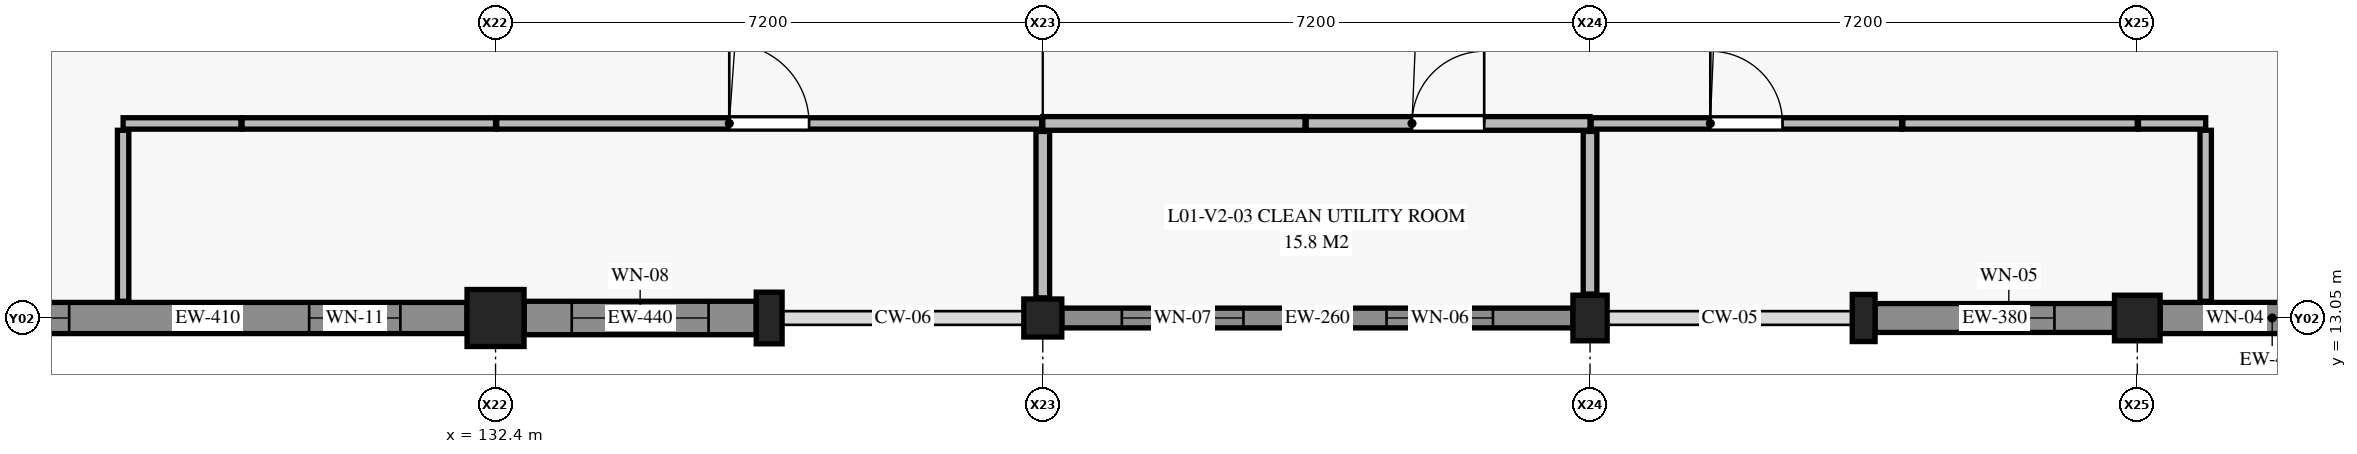
"""IFC4 building model, lengths in metres.
Left out: names, types, materials, properties, quantities, classifications, styles, units other than length and angle.
Written with IfcOpenShell. Run it as: python <this file> out.ifc"""

import sys

from ifc_helpers import new_model, si_unit, direction, frame, frame_2d, origin, origin_2d, place, context, subcontext, project, spatial, rectangle, extrude, element, fill, save


model = new_model("IFC4")
c1 = context("Model", 3, precision=1e-05, world=origin(), true_north=direction((0.0, 1.0)))
c2 = subcontext(c1, "Body", "Model", "MODEL_VIEW")
j1 = project(units=[si_unit("LENGTHUNIT", "METRE"), si_unit("PLANEANGLEUNIT", "RADIAN")], contexts=[c1])
p1 = place(None, origin())
s1 = spatial("IfcSite", under=j1, at=p1, CompositionType="ELEMENT")
p2 = place(p1, origin())
s2 = spatial("IfcBuilding", under=s1, at=p2, CompositionType="ELEMENT")
p3 = place(p2, frame((0.0, 0.0, 4.8)))
s3 = spatial("IfcBuildingStorey", under=s2, at=p3, CompositionType="ELEMENT", Elevation=4.8)
p4 = place(p3, frame((132.4, 13.05, 0.0), z_axis=(0.0, 0.0, 1.0), x_axis=(1.0, 0.0, 0.0)))
e1 = element("IfcColumn", 1, at=p4, inside=s3, PredefinedType="COLUMN", context=c2, shape_type="SweptSolid", body=[
    extrude(rectangle(XDim=0.75, YDim=0.75, at=origin_2d()), origin(), (0.0, 0.0, 1.0), 4.36),
])
p5 = place(p3, frame((139.6, 13.05, 0.0), z_axis=(0.0, 0.0, 1.0), x_axis=(1.0, 0.0, 0.0)))
e2 = element("IfcColumn", 2, at=p5, inside=s3, PredefinedType="COLUMN", context=c2, shape_type="SweptSolid", body=[
    extrude(rectangle(XDim=0.5, YDim=0.5, at=origin_2d()), origin(), (0.0, 0.0, 1.0), 4.36),
])
p6 = place(p3, frame((146.8, 13.05, 0.0), z_axis=(0.0, 0.0, 1.0), x_axis=(1.0, 0.0, 0.0)))
e3 = element("IfcColumn", 3, at=p6, inside=s3, PredefinedType="COLUMN", context=c2, shape_type="SweptSolid", body=[
    extrude(rectangle(XDim=0.45, YDim=0.6, at=origin_2d()), origin(), (0.0, 0.0, 1.0), 4.36),
])
p7 = place(p3, frame((154.0, 13.05, 0.0), z_axis=(0.0, 0.0, 1.0), x_axis=(1.0, 0.0, 0.0)))
e4 = element("IfcColumn", 4, at=p7, inside=s3, PredefinedType="COLUMN", context=c2, shape_type="SweptSolid", body=[
    extrude(rectangle(XDim=0.6, YDim=0.6, at=origin_2d()), origin(), (0.0, 0.0, 1.0), 4.36),
])
p8 = place(p3, frame((136.0, 13.05, 0.0), z_axis=(0.0, 0.0, 1.0), x_axis=(1.0, 0.0, 0.0)))
e5 = element("IfcColumn", 5, at=p8, inside=s3, PredefinedType="PILASTER", context=c2, shape_type="SweptSolid", body=[
    extrude(rectangle(XDim=0.34, YDim=0.68, at=origin_2d()), origin(), (0.0, 0.0, 1.0), 4.2),
])
p9 = place(p3, frame((150.4, 13.05, 0.0), z_axis=(0.0, 0.0, 1.0), x_axis=(1.0, 0.0, 0.0)))
e6 = element("IfcColumn", 6, at=p9, inside=s3, PredefinedType="PILASTER", context=c2, shape_type="SweptSolid", body=[
    extrude(rectangle(XDim=0.3, YDim=0.62, at=origin_2d()), origin(), (0.0, 0.0, 1.0), 4.2),
])
p10 = place(p3, frame((157.25, 13.05, 0.0), z_axis=(0.0, 0.0, 1.0), x_axis=(-1.0, 0.0, 0.0)))
e7 = element("IfcWall", 7, at=p10, inside=s3, PredefinedType="USERDEFINED", context=c2, shape_type="SweptSolid", body=[
    extrude(rectangle(XDim=2.95, YDim=0.41, at=frame_2d((1.475, 0.0))), origin(), (0.0, 0.0, 1.0), 3.38),
])
p11 = place(p10, frame((0.64, 0.0, 0.9)))
e8 = element("IfcOpeningElement", 8, at=p11, cuts=e7, PredefinedType="OPENING", context=c2, shape_type="SweptSolid", body=[
    extrude(rectangle(XDim=1.05, YDim=1.8, at=frame_2d((0.525, 0.9))), frame((0.0, 0.215, 0.0), z_axis=(0.0, -1.0, 0.0), x_axis=(1.0, 0.0, 0.0)), (0.0, 0.0, 1.0), 0.43),
])
p12 = place(p3, frame((153.7, 13.05, 0.0), z_axis=(0.0, 0.0, 1.0), x_axis=(-1.0, 0.0, 0.0)))
e9 = element("IfcWall", 9, at=p12, inside=s3, PredefinedType="USERDEFINED", context=c2, shape_type="SweptSolid", body=[
    extrude(rectangle(XDim=3.15, YDim=0.38, at=frame_2d((1.575, 0.0))), origin(), (0.0, 0.0, 1.0), 3.38),
])
p13 = place(p12, frame((0.79, 0.0, 0.9)))
e10 = element("IfcOpeningElement", 10, at=p13, cuts=e9, PredefinedType="OPENING", context=c2, shape_type="SweptSolid", body=[
    extrude(rectangle(XDim=1.2, YDim=1.8, at=frame_2d((0.6, 0.9))), frame((0.0, 0.2, 0.0), z_axis=(0.0, -1.0, 0.0), x_axis=(1.0, 0.0, 0.0)), (0.0, 0.0, 1.0), 0.4),
])
p14 = place(p3, frame((146.575, 13.05, 0.0), z_axis=(0.0, 0.0, 1.0), x_axis=(-1.0, 0.0, 0.0)))
e11 = element("IfcWall", 11, at=p14, inside=s3, PredefinedType="SOLIDWALL", context=c2, shape_type="SweptSolid", body=[
    extrude(rectangle(XDim=6.725, YDim=0.26, at=frame_2d((3.362, 0.0))), origin(), (0.0, 0.0, 1.0), 3.3),
])
p15 = place(p14, frame((1.052, 0.0, 0.9)))
e12 = element("IfcOpeningElement", 12, at=p15, cuts=e11, PredefinedType="OPENING", context=c2, shape_type="SweptSolid", body=[
    extrude(rectangle(XDim=1.4, YDim=1.8, at=frame_2d((0.7, 0.9))), frame((0.0, 0.14, 0.0), z_axis=(0.0, -1.0, 0.0), x_axis=(1.0, 0.0, 0.0)), (0.0, 0.0, 1.0), 0.28),
])
p16 = place(p14, frame((4.335, 0.0, 0.9)))
e13 = element("IfcOpeningElement", 13, at=p16, cuts=e11, PredefinedType="OPENING", context=c2, shape_type="SweptSolid", body=[
    extrude(rectangle(XDim=1.6, YDim=1.8, at=frame_2d((0.8, 0.9))), frame((0.0, 0.14, 0.0), z_axis=(0.0, -1.0, 0.0), x_axis=(1.0, 0.0, 0.0)), (0.0, 0.0, 1.0), 0.28),
])
p17 = place(p3, frame((135.83, 13.05, 0.0), z_axis=(0.0, 0.0, 1.0), x_axis=(-1.0, 0.0, 0.0)))
e14 = element("IfcWall", 14, at=p17, inside=s3, PredefinedType="USERDEFINED", context=c2, shape_type="SweptSolid", body=[
    extrude(rectangle(XDim=3.055, YDim=0.44, at=frame_2d((1.528, 0.0))), origin(), (0.0, 0.0, 1.0), 3.38),
])
p18 = place(p17, frame((0.627, 0.0, 0.9)))
e15 = element("IfcOpeningElement", 15, at=p18, cuts=e14, PredefinedType="OPENING", context=c2, shape_type="SweptSolid", body=[
    extrude(rectangle(XDim=1.8, YDim=1.8, at=frame_2d((0.9, 0.9))), frame((0.0, 0.23, 0.0), z_axis=(0.0, -1.0, 0.0), x_axis=(1.0, 0.0, 0.0)), (0.0, 0.0, 1.0), 0.46),
])
p19 = place(p3, frame((132.025, 13.05, 0.0), z_axis=(0.0, 0.0, 1.0), x_axis=(-1.0, 0.0, 0.0)))
e16 = element("IfcWall", 16, at=p19, inside=s3, PredefinedType="USERDEFINED", context=c2, shape_type="SweptSolid", body=[
    extrude(rectangle(XDim=6.825, YDim=0.41, at=frame_2d((3.413, 0.0))), origin(), (0.0, 0.0, 1.0), 3.38),
])
p20 = place(p19, frame((0.877, 0.0, 0.9)))
e17 = element("IfcOpeningElement", 17, at=p20, cuts=e16, PredefinedType="OPENING", context=c2, shape_type="SweptSolid", body=[
    extrude(rectangle(XDim=1.2, YDim=1.5, at=frame_2d((0.6, 0.75))), frame((0.0, 0.215, 0.0), z_axis=(0.0, -1.0, 0.0), x_axis=(1.0, 0.0, 0.0)), (0.0, 0.0, 1.0), 0.43),
])
p21 = place(p19, frame((5.235, 0.0, 0.95)))
e18 = element("IfcOpeningElement", 18, at=p21, cuts=e16, PredefinedType="OPENING", context=c2, shape_type="SweptSolid", body=[
    extrude(rectangle(XDim=0.9, YDim=1.2, at=frame_2d((0.45, 0.6))), frame((0.0, 0.215, 0.0), z_axis=(0.0, -1.0, 0.0), x_axis=(1.0, 0.0, 0.0)), (0.0, 0.0, 1.0), 0.43),
])
p22 = place(p3, frame((139.6, 15.61, 0.0), z_axis=(0.0, 0.0, 1.0), x_axis=(1.0, 0.0, 0.0)))
e19 = element("IfcWall", 19, at=p22, inside=s3, PredefinedType="PLUMBINGWALL", context=c2, shape_type="SweptSolid", body=[
    extrude(rectangle(XDim=3.45, YDim=0.18, at=frame_2d((1.725, 0.0))), origin(), (0.0, 0.0, 1.0), 3.95),
])
p23 = place(p3, frame((143.065, 15.61, 0.0), z_axis=(0.0, 0.0, 1.0), x_axis=(1.0, 0.0, 0.0)))
e20 = element("IfcWall", 20, at=p23, inside=s3, PredefinedType="PLUMBINGWALL", context=c2, shape_type="SweptSolid", body=[
    extrude(rectangle(XDim=3.735, YDim=0.18, at=frame_2d((1.868, 0.0))), origin(), (0.0, 0.0, 1.0), 3.95),
])
p24 = place(p23, frame((1.393, 0.0, 0.0)))
e21 = element("IfcOpeningElement", 21, at=p24, cuts=e20, PredefinedType="OPENING", context=c2, shape_type="SweptSolid", body=[
    extrude(rectangle(XDim=0.95, YDim=2.1, at=frame_2d((0.475, 1.05))), frame((0.0, 0.1, 0.0), z_axis=(0.0, -1.0, 0.0), x_axis=(1.0, 0.0, 0.0)), (0.0, 0.0, 1.0), 0.2),
])
p25 = place(p3, frame((127.5, 15.61, 0.0), z_axis=(0.0, 0.0, 1.0), x_axis=(1.0, 0.0, 0.0)))
e22 = element("IfcWall", 22, at=p25, inside=s3, PredefinedType="PARTITIONING", context=c2, shape_type="SweptSolid", body=[
    extrude(rectangle(XDim=1.55, YDim=0.15, at=frame_2d((0.775, 0.0))), origin(), (0.0, 0.0, 1.0), 3.95),
])
p26 = place(p3, frame((129.065, 15.61, 0.0), z_axis=(0.0, 0.0, 1.0), x_axis=(1.0, 0.0, 0.0)))
e23 = element("IfcWall", 23, at=p26, inside=s3, PredefinedType="PARTITIONING", context=c2, shape_type="SweptSolid", body=[
    extrude(rectangle(XDim=3.335, YDim=0.15, at=frame_2d((1.667, 0.0))), origin(), (0.0, 0.0, 1.0), 3.95),
])
p27 = place(p3, frame((132.415, 15.61, 0.0), z_axis=(0.0, 0.0, 1.0), x_axis=(1.0, 0.0, 0.0)))
e24 = element("IfcWall", 24, at=p27, inside=s3, PredefinedType="PARTITIONING", context=c2, shape_type="SweptSolid", body=[
    extrude(rectangle(XDim=7.17, YDim=0.15, at=frame_2d((3.585, 0.0))), origin(), (0.0, 0.0, 1.0), 3.95),
])
p28 = place(p27, frame((3.06, 0.0, 0.0)))
e25 = element("IfcOpeningElement", 25, at=p28, cuts=e24, PredefinedType="OPENING", context=c2, shape_type="SweptSolid", body=[
    extrude(rectangle(XDim=1.05, YDim=2.15, at=frame_2d((0.525, 1.075))), frame((0.0, 0.085, 0.0), z_axis=(0.0, -1.0, 0.0), x_axis=(1.0, 0.0, 0.0)), (0.0, 0.0, 1.0), 0.17),
])
p29 = place(p3, frame((127.5, 13.27, 0.0), z_axis=(0.0, 0.0, 1.0), x_axis=(0.0, 1.0, 0.0)))
e26 = element("IfcWall", 26, at=p29, inside=s3, PredefinedType="PARTITIONING", context=c2, shape_type="SweptSolid", body=[
    extrude(rectangle(XDim=2.25, YDim=0.15, at=frame_2d((1.125, 0.0))), origin(), (0.0, 0.0, 1.0), 3.95),
])
p30 = place(p3, frame((146.815, 15.61, 0.0), z_axis=(0.0, 0.0, 1.0), x_axis=(1.0, 0.0, 0.0)))
e27 = element("IfcWall", 27, at=p30, inside=s3, PredefinedType="PARTITIONING", context=c2, shape_type="SweptSolid", body=[
    extrude(rectangle(XDim=4.085, YDim=0.15, at=frame_2d((2.042, 0.0))), origin(), (0.0, 0.0, 1.0), 3.95),
])
p31 = place(p30, frame((1.567, 0.0, 0.0)))
e28 = element("IfcOpeningElement", 28, at=p31, cuts=e27, PredefinedType="OPENING", context=c2, shape_type="SweptSolid", body=[
    extrude(rectangle(XDim=0.95, YDim=2.1, at=frame_2d((0.475, 1.05))), frame((0.0, 0.085, 0.0), z_axis=(0.0, -1.0, 0.0), x_axis=(1.0, 0.0, 0.0)), (0.0, 0.0, 1.0), 0.17),
])
p32 = place(p3, frame((150.915, 15.61, 0.0), z_axis=(0.0, 0.0, 1.0), x_axis=(1.0, 0.0, 0.0)))
e29 = element("IfcWall", 29, at=p32, inside=s3, PredefinedType="PARTITIONING", context=c2, shape_type="SweptSolid", body=[
    extrude(rectangle(XDim=3.085, YDim=0.15, at=frame_2d((1.542, 0.0))), origin(), (0.0, 0.0, 1.0), 3.95),
])
p33 = place(p3, frame((154.015, 15.61, 0.0), z_axis=(0.0, 0.0, 1.0), x_axis=(1.0, 0.0, 0.0)))
e30 = element("IfcWall", 30, at=p33, inside=s3, PredefinedType="PARTITIONING", context=c2, shape_type="SweptSolid", body=[
    extrude(rectangle(XDim=0.885, YDim=0.15, at=frame_2d((0.442, 0.0))), origin(), (0.0, 0.0, 1.0), 3.95),
])
p34 = place(p3, frame((154.9, 13.27, 0.0), z_axis=(0.0, 0.0, 1.0), x_axis=(0.0, 1.0, 0.0)))
e31 = element("IfcWall", 31, at=p34, inside=s3, PredefinedType="PARTITIONING", context=c2, shape_type="SweptSolid", body=[
    extrude(rectangle(XDim=2.25, YDim=0.15, at=frame_2d((1.125, 0.0))), origin(), (0.0, 0.0, 1.0), 3.95),
])
p35 = place(p3, frame((139.6, 13.315, 0.0), z_axis=(0.0, 0.0, 1.0), x_axis=(0.0, 1.0, 0.0)))
e32 = element("IfcWall", 32, at=p35, inside=s3, PredefinedType="PLUMBINGWALL", context=c2, shape_type="SweptSolid", body=[
    extrude(rectangle(XDim=2.19, YDim=0.18, at=frame_2d((1.095, 0.0))), origin(), (0.0, 0.0, 1.0), 3.95),
])
p36 = place(p3, frame((146.8, 13.365, 0.0), z_axis=(0.0, 0.0, 1.0), x_axis=(0.0, 1.0, 0.0)))
e33 = element("IfcWall", 33, at=p36, inside=s3, PredefinedType="PLUMBINGWALL", context=c2, shape_type="SweptSolid", body=[
    extrude(rectangle(XDim=2.14, YDim=0.18, at=frame_2d((1.07, 0.0))), origin(), (0.0, 0.0, 1.0), 3.95),
])
p37 = place(p11, origin())
e34 = element("IfcWindow", 34, at=p37, inside=s3, PartitioningType="SINGLE_PANEL", PredefinedType="WINDOW", context=c2, shape_type="SweptSolid", body=[
    extrude(rectangle(XDim=1.05, YDim=1.8, at=frame_2d((0.525, 0.9))), frame((0.0, 0.03, 0.0), z_axis=(0.0, -1.0, 0.0), x_axis=(1.0, 0.0, 0.0)), (0.0, 0.0, 1.0), 0.06),
])
fill(e8, e34)
p38 = place(p13, origin())
e35 = element("IfcWindow", 35, at=p38, inside=s3, PartitioningType="SINGLE_PANEL", PredefinedType="WINDOW", context=c2, shape_type="SweptSolid", body=[
    extrude(rectangle(XDim=1.2, YDim=1.8, at=frame_2d((0.6, 0.9))), frame((0.0, 0.03, 0.0), z_axis=(0.0, -1.0, 0.0), x_axis=(1.0, 0.0, 0.0)), (0.0, 0.0, 1.0), 0.06),
])
fill(e10, e35)
p39 = place(p15, origin())
e36 = element("IfcWindow", 36, at=p39, inside=s3, PartitioningType="SINGLE_PANEL", PredefinedType="WINDOW", context=c2, shape_type="SweptSolid", body=[
    extrude(rectangle(XDim=1.4, YDim=1.8, at=frame_2d((0.7, 0.9))), frame((0.0, 0.03, 0.0), z_axis=(0.0, -1.0, 0.0), x_axis=(1.0, 0.0, 0.0)), (0.0, 0.0, 1.0), 0.06),
])
fill(e12, e36)
p40 = place(p16, origin())
e37 = element("IfcWindow", 37, at=p40, inside=s3, PartitioningType="SINGLE_PANEL", PredefinedType="WINDOW", context=c2, shape_type="SweptSolid", body=[
    extrude(rectangle(XDim=1.6, YDim=1.8, at=frame_2d((0.8, 0.9))), frame((0.0, 0.03, 0.0), z_axis=(0.0, -1.0, 0.0), x_axis=(1.0, 0.0, 0.0)), (0.0, 0.0, 1.0), 0.06),
])
fill(e13, e37)
p41 = place(p18, origin())
e38 = element("IfcWindow", 38, at=p41, inside=s3, PartitioningType="SINGLE_PANEL", PredefinedType="WINDOW", context=c2, shape_type="SweptSolid", body=[
    extrude(rectangle(XDim=1.8, YDim=1.8, at=frame_2d((0.9, 0.9))), frame((0.0, 0.03, 0.0), z_axis=(0.0, -1.0, 0.0), x_axis=(1.0, 0.0, 0.0)), (0.0, 0.0, 1.0), 0.06),
])
fill(e15, e38)
p42 = place(p20, origin())
e39 = element("IfcWindow", 39, at=p42, inside=s3, PartitioningType="SINGLE_PANEL", PredefinedType="WINDOW", context=c2, shape_type="SweptSolid", body=[
    extrude(rectangle(XDim=1.2, YDim=1.5, at=frame_2d((0.6, 0.75))), frame((0.0, 0.03, 0.0), z_axis=(0.0, -1.0, 0.0), x_axis=(1.0, 0.0, 0.0)), (0.0, 0.0, 1.0), 0.06),
])
fill(e17, e39)
p43 = place(p21, origin())
e40 = element("IfcWindow", 40, at=p43, inside=s3, PartitioningType="SINGLE_PANEL", PredefinedType="WINDOW", context=c2, shape_type="SweptSolid", body=[
    extrude(rectangle(XDim=0.9, YDim=1.2, at=frame_2d((0.45, 0.6))), frame((0.0, 0.03, 0.0), z_axis=(0.0, -1.0, 0.0), x_axis=(1.0, 0.0, 0.0)), (0.0, 0.0, 1.0), 0.06),
])
fill(e18, e40)
p44 = place(p28, origin())
e41 = element("IfcDoor", 41, at=p44, inside=s3, OperationType="SINGLE_SWING_LEFT", PredefinedType="DOOR", context=c2, shape_type="SweptSolid", body=[
    extrude(rectangle(XDim=1.05, YDim=2.15, at=frame_2d((0.525, 1.075))), frame((0.0, 0.025, 0.0), z_axis=(0.0, -1.0, 0.0), x_axis=(1.0, 0.0, 0.0)), (0.0, 0.0, 1.0), 0.05),
])
fill(e25, e41)
p45 = place(p24, origin())
e42 = element("IfcDoor", 42, at=p45, inside=s3, OperationType="SINGLE_SWING_RIGHT", PredefinedType="DOOR", context=c2, shape_type="SweptSolid", body=[
    extrude(rectangle(XDim=0.95, YDim=2.1, at=frame_2d((0.475, 1.05))), frame((0.0, 0.025, 0.0), z_axis=(0.0, -1.0, 0.0), x_axis=(1.0, 0.0, 0.0)), (0.0, 0.0, 1.0), 0.05),
])
fill(e21, e42)
p46 = place(p31, origin())
e43 = element("IfcDoor", 43, at=p46, inside=s3, OperationType="SINGLE_SWING_LEFT", PredefinedType="DOOR", context=c2, shape_type="SweptSolid", body=[
    extrude(rectangle(XDim=0.95, YDim=2.1, at=frame_2d((0.475, 1.05))), frame((0.0, 0.025, 0.0), z_axis=(0.0, -1.0, 0.0), x_axis=(1.0, 0.0, 0.0)), (0.0, 0.0, 1.0), 0.05),
])
fill(e28, e43)
save(model, sys.argv[1])
